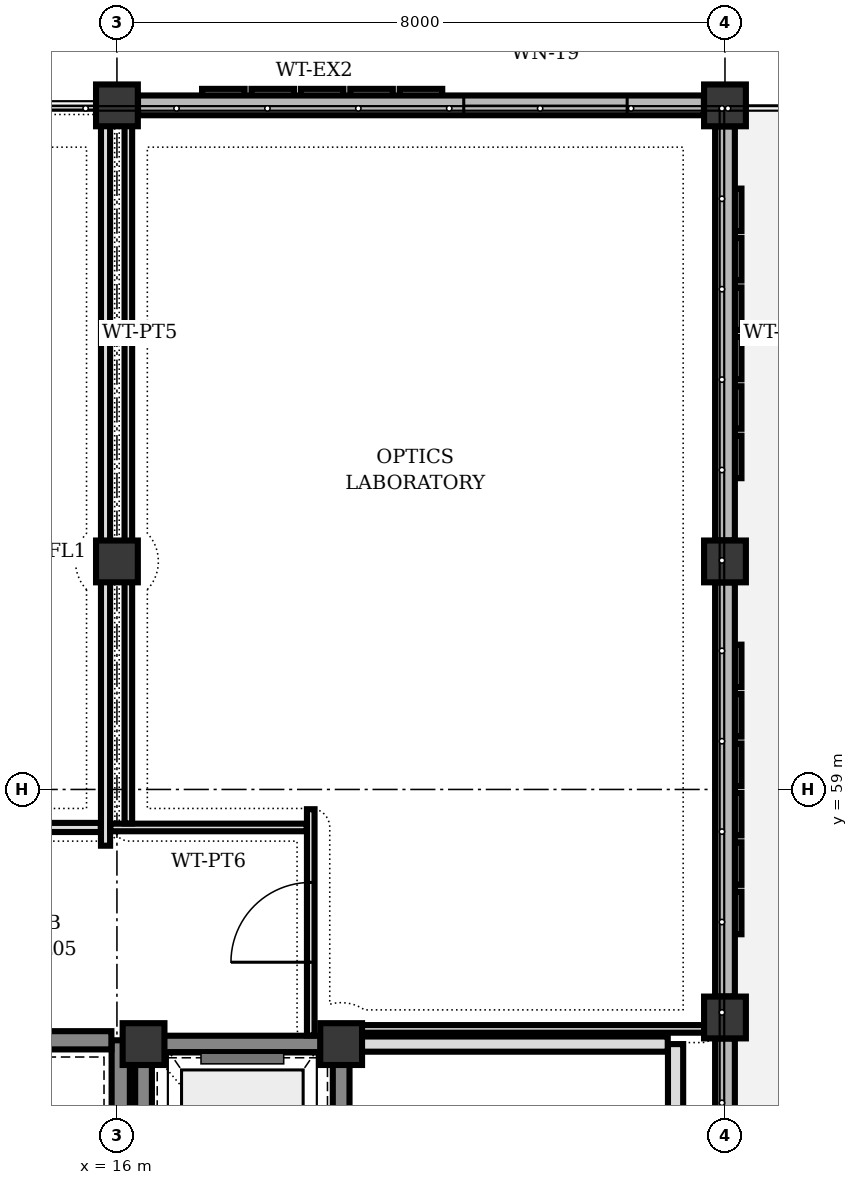
"""IFC4 building model, lengths in metres.
Left out: names, types, materials, properties, quantities, classifications, styles, units other than length and angle.
Written with IfcOpenShell. Run it as: python <this file> out.ifc"""

import sys

from ifc_helpers import new_model, si_unit, direction, frame, frame_2d, origin, origin_2d, place, context, subcontext, project, spatial, rectangle, extrude, element, fill, save


model = new_model("IFC4")
c1 = context("Model", 3, precision=1e-05, world=origin(), true_north=direction((0.0, 1.0)))
c2 = subcontext(c1, "Body", "Model", "MODEL_VIEW")
j1 = project(units=[si_unit("LENGTHUNIT", "METRE"), si_unit("PLANEANGLEUNIT", "RADIAN")], contexts=[c1])
p1 = place(None, origin())
s1 = spatial("IfcSite", under=j1, at=p1, CompositionType="ELEMENT")
p2 = place(p1, origin())
s2 = spatial("IfcBuilding", under=s1, at=p2, CompositionType="ELEMENT")
p3 = place(p2, frame((0.0, 0.0, 20.5)))
s3 = spatial("IfcBuildingStorey", under=s2, at=p3, CompositionType="ELEMENT", Elevation=20.5)
for number, where, z_axis, x_axis in (
    (1, (18.95, 55.65, 0.0), (0.0, 0.0, 1.0), (1.0, 0.0, 0.0)),
    (2, (16.35, 55.65, 0.0), (0.0, 0.0, 1.0), (1.0, 0.0, 0.0)),
    (3, (16.0, 62.0, 0.0), (0.0, 0.0, 1.0), (1.0, 0.0, 0.0)),
    (4, (16.0, 68.0, 0.0), (0.0, 0.0, 1.0), (1.0, 0.0, 0.0)),
    (5, (24.0, 56.0, 0.0), (0.0, 0.0, 1.0), (1.0, 0.0, 0.0)),
    (6, (24.0, 62.0, 0.0), (0.0, 0.0, 1.0), (1.0, 0.0, 0.0)),
    (7, (24.0, 68.0, 0.0), (0.0, 0.0, 1.0), (1.0, 0.0, 0.0)),
):
    element("IfcColumn", number, at=place(p3, frame(where, z_axis=z_axis, x_axis=x_axis)), inside=s3, PredefinedType="COLUMN", context=c2, shape_type="SweptSolid", body=[
        extrude(rectangle(XDim=0.55, YDim=0.55, at=origin_2d()), origin(), (0.0, 0.0, 1.0), 4.0),
    ])
p4 = place(p3, frame((16.277, 68.0, 0.0), z_axis=(0.0, 0.0, 1.0), x_axis=(1.0, 0.0, 0.0)))
e8 = element("IfcWall", 8, at=p4, inside=s3, PredefinedType="SOLIDWALL", context=c2, shape_type="SweptSolid", body=[
    extrude(rectangle(XDim=7.446, YDim=0.26, at=frame_2d((3.723, 0.0))), origin(), (0.0, 0.0, 1.0), 3.14),
])
p5 = place(p4, frame((4.286, 0.0, 0.9)))
e9 = element("IfcOpeningElement", 9, at=p5, cuts=e8, PredefinedType="OPENING", context=c2, shape_type="SweptSolid", body=[
    extrude(rectangle(XDim=2.15, YDim=1.25, at=frame_2d((1.075, 0.625))), frame((0.0, 0.14, 0.0), z_axis=(0.0, -1.0, 0.0), x_axis=(1.0, 0.0, 0.0)), (0.0, 0.0, 1.0), 0.28),
])
p6 = place(p3, frame((24.0, 67.723, 0.0), z_axis=(0.0, 0.0, 1.0), x_axis=(0.0, -1.0, 0.0)))
e10 = element("IfcWall", 10, at=p6, inside=s3, PredefinedType="SOLIDWALL", context=c2, shape_type="SweptSolid", body=[
    extrude(rectangle(XDim=5.446, YDim=0.26, at=frame_2d((2.723, 0.0))), origin(), (0.0, 0.0, 1.0), 3.397),
])
p7 = place(p3, frame((24.0, 61.723, 0.0), z_axis=(0.0, 0.0, 1.0), x_axis=(0.0, -1.0, 0.0)))
e11 = element("IfcWall", 11, at=p7, inside=s3, PredefinedType="SOLIDWALL", context=c2, shape_type="SweptSolid", body=[
    extrude(rectangle(XDim=5.446, YDim=0.26, at=frame_2d((2.723, 0.0))), origin(), (0.0, 0.0, 1.0), 3.545),
])
p8 = place(p3, frame((24.0, 55.723, 0.0), z_axis=(0.0, 0.0, 1.0), x_axis=(0.0, -1.0, 0.0)))
e12 = element("IfcWall", 12, at=p8, inside=s3, PredefinedType="SOLIDWALL", context=c2, shape_type="SweptSolid", body=[
    extrude(rectangle(XDim=7.446, YDim=0.26, at=frame_2d((3.723, 0.0))), origin(), (0.0, 0.0, 1.0), 3.435),
])
p9 = place(p8, frame((4.662, 0.0, 0.0)))
e13 = element("IfcOpeningElement", 13, at=p9, cuts=e12, PredefinedType="OPENING", context=c2, shape_type="SweptSolid", body=[
    extrude(rectangle(XDim=1.1, YDim=2.25, at=frame_2d((0.55, 1.125))), frame((0.0, 0.14, 0.0), z_axis=(0.0, -1.0, 0.0), x_axis=(1.0, 0.0, 0.0)), (0.0, 0.0, 1.0), 0.28),
])
p10 = place(p3, frame((16.05, 55.7, 0.0), z_axis=(0.0, 0.0, 1.0), x_axis=(0.0, -1.0, 0.0)))
e14 = element("IfcWall", 14, at=p10, inside=s3, PredefinedType="SHEAR", context=c2, shape_type="SweptSolid", body=[
    extrude(rectangle(XDim=4.608, YDim=0.24, at=frame_2d((2.304, 0.0))), origin(), (0.0, 0.0, 1.0), 3.74),
])
p11 = place(p3, frame((15.927, 55.7, 0.0), z_axis=(0.0, 0.0, 1.0), x_axis=(-1.0, 0.0, 0.0)))
e15 = element("IfcWall", 15, at=p11, inside=s3, PredefinedType="SHEAR", context=c2, shape_type="SweptSolid", body=[
    extrude(rectangle(XDim=7.385, YDim=0.24, at=frame_2d((3.692, 0.0))), origin(), (0.0, 0.0, 1.0), 3.74),
])
p12 = place(p3, frame((18.95, 52.917, 0.0), z_axis=(0.0, 0.0, 1.0), x_axis=(0.0, 1.0, 0.0)))
e16 = element("IfcWall", 16, at=p12, inside=s3, PredefinedType="SHEAR", context=c2, shape_type="SweptSolid", body=[
    extrude(rectangle(XDim=2.466, YDim=0.22, at=frame_2d((1.233, 0.0))), origin(), (0.0, 0.0, 1.0), 3.74),
])
p13 = place(p12, frame((0.683, 0.0, 0.0)))
e17 = element("IfcOpeningElement", 17, at=p13, cuts=e16, PredefinedType="OPENING", context=c2, shape_type="SweptSolid", body=[
    extrude(rectangle(XDim=1.1, YDim=2.15, at=frame_2d((0.55, 1.075))), frame((0.0, 0.12, 0.0), z_axis=(0.0, -1.0, 0.0), x_axis=(1.0, 0.0, 0.0)), (0.0, 0.0, 1.0), 0.24),
])
p14 = place(p3, frame((18.683, 55.65, 0.0), z_axis=(0.0, 0.0, 1.0), x_axis=(-1.0, 0.0, 0.0)))
e18 = element("IfcWall", 18, at=p14, inside=s3, PredefinedType="SHEAR", context=c2, shape_type="SweptSolid", body=[
    extrude(rectangle(XDim=2.066, YDim=0.22, at=frame_2d((1.033, 0.0))), origin(), (0.0, 0.0, 1.0), 3.74),
])
p15 = place(p3, frame((16.35, 55.383, 0.0), z_axis=(0.0, 0.0, 1.0), x_axis=(0.0, -1.0, 0.0)))
e19 = element("IfcWall", 19, at=p15, inside=s3, PredefinedType="SHEAR", context=c2, shape_type="SweptSolid", body=[
    extrude(rectangle(XDim=2.466, YDim=0.22, at=frame_2d((1.233, 0.0))), origin(), (0.0, 0.0, 1.0), 3.74),
])
p16 = place(p3, frame((23.35, 50.85, 0.0), z_axis=(0.0, 0.0, 1.0), x_axis=(0.0, 1.0, 0.0)))
e20 = element("IfcWall", 20, at=p16, inside=s3, PredefinedType="PARTITIONING", context=c2, shape_type="SweptSolid", body=[
    extrude(rectangle(XDim=4.8, YDim=0.2, at=frame_2d((2.4, 0.0))), origin(), (0.0, 0.0, 1.0), 3.7),
])
p17 = place(p3, frame((19.217, 55.65, 0.0), z_axis=(0.0, 0.0, 1.0), x_axis=(1.0, 0.0, 0.0)))
e21 = element("IfcWall", 21, at=p17, inside=s3, PredefinedType="PARTITIONING", context=c2, shape_type="SweptSolid", body=[
    extrude(rectangle(XDim=4.03, YDim=0.2, at=frame_2d((2.015, 0.0))), origin(), (0.0, 0.0, 1.0), 3.7),
])
p18 = place(p3, frame((15.85, 67.733, 0.0), z_axis=(0.0, 0.0, 1.0), x_axis=(0.0, -1.0, 0.0)))
e22 = element("IfcWall", 22, at=p18, inside=s3, PredefinedType="PARTITIONING", context=c2, shape_type="SweptSolid", body=[
    extrude(rectangle(XDim=5.466, YDim=0.12, at=frame_2d((2.733, 0.0))), origin(), (0.0, 0.0, 1.0), 3.397),
])
p19 = place(p3, frame((15.85, 61.733, 0.0), z_axis=(0.0, 0.0, 1.0), x_axis=(0.0, -1.0, 0.0)))
e23 = element("IfcWall", 23, at=p19, inside=s3, PredefinedType="PARTITIONING", context=c2, shape_type="SweptSolid", body=[
    extrude(rectangle(XDim=3.473, YDim=0.12, at=frame_2d((1.736, 0.0))), origin(), (0.0, 0.0, 1.0), 3.7),
])
p20 = place(p3, frame((15.787, 58.5, 0.0), z_axis=(0.0, 0.0, 1.0), x_axis=(-1.0, 0.0, 0.0)))
e24 = element("IfcWall", 24, at=p20, inside=s3, PredefinedType="PARTITIONING", context=c2, shape_type="SweptSolid", body=[
    extrude(rectangle(XDim=7.877, YDim=0.12, at=frame_2d((3.938, 0.0))), origin(), (0.0, 0.0, 1.0), 3.7),
])
p21 = place(p20, frame((3.499, 0.0, 0.0)))
e25 = element("IfcOpeningElement", 25, at=p21, cuts=e24, PredefinedType="OPENING", context=c2, shape_type="SweptSolid", body=[
    extrude(rectangle(XDim=0.88, YDim=2.1, at=frame_2d((0.44, 1.05))), frame((0.0, 0.07, 0.0), z_axis=(0.0, -1.0, 0.0), x_axis=(1.0, 0.0, 0.0)), (0.0, 0.0, 1.0), 0.14),
])
p22 = place(p3, frame((23.733, 55.85, 0.0), z_axis=(0.0, 0.0, 1.0), x_axis=(-1.0, 0.0, 0.0)))
e26 = element("IfcWall", 26, at=p22, inside=s3, PredefinedType="PARTITIONING", context=c2, shape_type="SweptSolid", body=[
    extrude(rectangle(XDim=4.516, YDim=0.1, at=frame_2d((2.258, 0.0))), origin(), (0.0, 0.0, 1.0), 3.7),
])
p23 = place(p3, frame((18.55, 55.763, 0.0), z_axis=(0.0, 0.0, 1.0), x_axis=(0.0, 1.0, 0.0)))
e27 = element("IfcWall", 27, at=p23, inside=s3, PredefinedType="PARTITIONING", context=c2, shape_type="SweptSolid", body=[
    extrude(rectangle(XDim=2.977, YDim=0.1, at=frame_2d((1.489, 0.0))), origin(), (0.0, 0.0, 1.0), 3.7),
])
p24 = place(p23, frame((0.964, 0.0, 0.0)))
e28 = element("IfcOpeningElement", 28, at=p24, cuts=e27, PredefinedType="OPENING", context=c2, shape_type="SweptSolid", body=[
    extrude(rectangle(XDim=1.05, YDim=2.1, at=frame_2d((0.525, 1.05))), frame((0.0, 0.06, 0.0), z_axis=(0.0, -1.0, 0.0), x_axis=(1.0, 0.0, 0.0)), (0.0, 0.0, 1.0), 0.12),
])
p25 = place(p3, frame((18.497, 58.5, 0.0), z_axis=(0.0, 0.0, 1.0), x_axis=(-1.0, 0.0, 0.0)))
e29 = element("IfcWall", 29, at=p25, inside=s3, PredefinedType="PARTITIONING", context=c2, shape_type="SweptSolid", body=[
    extrude(rectangle(XDim=2.584, YDim=0.1, at=frame_2d((1.292, 0.0))), origin(), (0.0, 0.0, 1.0), 3.7),
])
p26 = place(p3, frame((16.15, 58.553, 0.0), z_axis=(0.0, 0.0, 1.0), x_axis=(0.0, 1.0, 0.0)))
e30 = element("IfcWall", 30, at=p26, inside=s3, PredefinedType="PARTITIONING", context=c2, shape_type="SweptSolid", body=[
    extrude(rectangle(XDim=3.18, YDim=0.1, at=frame_2d((1.59, 0.0))), origin(), (0.0, 0.0, 1.0), 3.7),
])
p27 = place(p3, frame((16.15, 62.267, 0.0), z_axis=(0.0, 0.0, 1.0), x_axis=(0.0, 1.0, 0.0)))
e31 = element("IfcWall", 31, at=p27, inside=s3, PredefinedType="PARTITIONING", context=c2, shape_type="SweptSolid", body=[
    extrude(rectangle(XDim=5.466, YDim=0.1, at=frame_2d((2.733, 0.0))), origin(), (0.0, 0.0, 1.0), 3.397),
])
p28 = place(p5, origin())
e32 = element("IfcWindow", 32, at=p28, inside=s3, PartitioningType="SINGLE_PANEL", PredefinedType="WINDOW", context=c2, shape_type="SweptSolid", body=[
    extrude(rectangle(XDim=2.15, YDim=1.25, at=frame_2d((1.075, 0.625))), frame((0.0, 0.03, 0.0), z_axis=(0.0, -1.0, 0.0), x_axis=(1.0, 0.0, 0.0)), (0.0, 0.0, 1.0), 0.06),
])
fill(e9, e32)
p29 = place(p24, origin())
e33 = element("IfcDoor", 33, at=p29, inside=s3, OperationType="SINGLE_SWING_LEFT", PredefinedType="DOOR", context=c2, shape_type="SweptSolid", body=[
    extrude(rectangle(XDim=1.05, YDim=2.1, at=frame_2d((0.525, 1.05))), frame((0.0, 0.025, 0.0), z_axis=(0.0, -1.0, 0.0), x_axis=(1.0, 0.0, 0.0)), (0.0, 0.0, 1.0), 0.05),
])
fill(e28, e33)
save(model, sys.argv[1])
